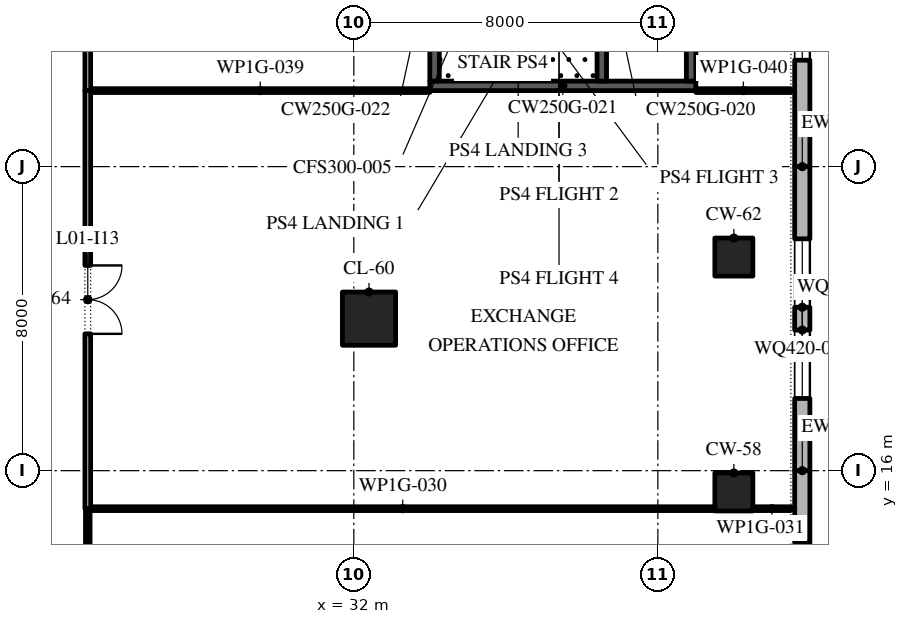
"""IFC4 building model, lengths in metres.
Left out: names, types, materials, properties, quantities, classifications, styles, units other than length and angle.
Written with IfcOpenShell. Run it as: python <this file> out.ifc"""

import sys

from ifc_helpers import new_model, si_unit, direction, frame, frame_2d, origin, origin_2d, place, context, subcontext, project, spatial, polyline, rectangle, outline, extrude, element, fill, save


model = new_model("IFC4")
c1 = context("Model", 3, precision=1e-05, world=origin(), true_north=direction((0.0, 1.0)))
c2 = subcontext(c1, "Body", "Model", "MODEL_VIEW")
j1 = project(units=[si_unit("LENGTHUNIT", "METRE"), si_unit("PLANEANGLEUNIT", "RADIAN")], contexts=[c1])
p1 = place(None, origin())
s1 = spatial("IfcSite", under=j1, at=p1, CompositionType="ELEMENT")
p2 = place(p1, origin())
s2 = spatial("IfcBuilding", under=s1, at=p2, CompositionType="ELEMENT")
p3 = place(p2, frame((0.0, 0.0, 8.0)))
s3 = spatial("IfcBuildingStorey", under=s2, at=p3, CompositionType="ELEMENT", Elevation=8.0)
p4 = place(p3, frame((42.0, 15.44, 0.0), z_axis=(0.0, 0.0, 1.0), x_axis=(1.0, 0.0, 0.0)))
e1 = element("IfcColumn", 1, at=p4, inside=s3, PredefinedType="COLUMN", context=c2, shape_type="SweptSolid", body=[
    extrude(rectangle(XDim=1.0, YDim=1.0, at=origin_2d()), origin(), (0.0, 0.0, 1.0), 6.0),
])
p5 = place(p3, frame((32.4, 20.0, 0.0), z_axis=(0.0, 0.0, 1.0), x_axis=(1.0, 0.0, 0.0)))
e2 = element("IfcColumn", 2, at=p5, inside=s3, PredefinedType="COLUMN", context=c2, shape_type="SweptSolid", body=[
    extrude(rectangle(XDim=1.4, YDim=1.4, at=origin_2d()), origin(), (0.0, 0.0, 1.0), 6.0),
])
p6 = place(p3, frame((42.0, 21.62, 0.0), z_axis=(0.0, 0.0, 1.0), x_axis=(1.0, 0.0, 0.0)))
e3 = element("IfcColumn", 3, at=p6, inside=s3, PredefinedType="COLUMN", context=c2, shape_type="SweptSolid", body=[
    extrude(rectangle(XDim=1.0, YDim=1.0, at=origin_2d()), origin(), (0.0, 0.0, 1.0), 6.0),
])
p7 = place(p3, frame((43.8, 8.0, 0.0), z_axis=(0.0, 0.0, 1.0), x_axis=(0.0, 1.0, 0.0)))
e4 = element("IfcWall", 4, at=p7, inside=s3, PredefinedType="STANDARD", context=c2, shape_type="SweptSolid", body=[
    extrude(rectangle(XDim=8.0, YDim=0.4, at=frame_2d((4.0, 0.0))), origin(), (0.0, 0.0, 1.0), 5.7),
])
p8 = place(p7, frame((1.9, 0.0, 0.9)))
e5 = element("IfcOpeningElement", 5, at=p8, cuts=e4, PredefinedType="OPENING", context=c2, shape_type="SweptSolid", body=[
    extrude(outline(polyline([(0.0, 0.0), (1.8, 0.0), (1.8, 2.641), (1.785, 2.876), (1.739, 3.107), (1.663, 3.33), (1.559, 3.541), (1.428, 3.737), (1.273, 3.914), (1.096, 4.069), (0.9, 4.2), (0.704, 4.069), (0.527, 3.914), (0.372, 3.737), (0.241, 3.541), (0.137, 3.33), (0.061, 3.107), (0.015, 2.876), (0.0, 2.641), (0.0, 0.0)])), frame((0.0, 0.21, 0.0), z_axis=(0.0, -1.0, 0.0), x_axis=(1.0, 0.0, 0.0)), (0.0, 0.0, 1.0), 0.42),
])
p9 = place(p7, frame((4.3, 0.0, 0.9)))
e6 = element("IfcOpeningElement", 6, at=p9, cuts=e4, PredefinedType="OPENING", context=c2, shape_type="SweptSolid", body=[
    extrude(outline(polyline([(0.0, 0.0), (1.8, 0.0), (1.8, 2.641), (1.785, 2.876), (1.739, 3.107), (1.663, 3.33), (1.559, 3.541), (1.428, 3.737), (1.273, 3.914), (1.096, 4.069), (0.9, 4.2), (0.704, 4.069), (0.527, 3.914), (0.372, 3.737), (0.241, 3.541), (0.137, 3.33), (0.061, 3.107), (0.015, 2.876), (0.0, 2.641), (0.0, 0.0)])), frame((0.0, 0.21, 0.0), z_axis=(0.0, -1.0, 0.0), x_axis=(1.0, 0.0, 0.0)), (0.0, 0.0, 1.0), 0.42),
])
p10 = place(p3, frame((43.8, 16.0, 0.0), z_axis=(0.0, 0.0, 1.0), x_axis=(0.0, 1.0, 0.0)))
e7 = element("IfcWall", 7, at=p10, inside=s3, PredefinedType="STANDARD", context=c2, shape_type="SweptSolid", body=[
    extrude(rectangle(XDim=8.0, YDim=0.4, at=frame_2d((4.0, 0.0))), origin(), (0.0, 0.0, 1.0), 5.7),
])
p11 = place(p10, frame((1.9, 0.0, 0.9)))
e8 = element("IfcOpeningElement", 8, at=p11, cuts=e7, PredefinedType="OPENING", context=c2, shape_type="SweptSolid", body=[
    extrude(outline(polyline([(0.0, 0.0), (1.8, 0.0), (1.8, 2.641), (1.785, 2.876), (1.739, 3.107), (1.663, 3.33), (1.559, 3.541), (1.428, 3.737), (1.273, 3.914), (1.096, 4.069), (0.9, 4.2), (0.704, 4.069), (0.527, 3.914), (0.372, 3.737), (0.241, 3.541), (0.137, 3.33), (0.061, 3.107), (0.015, 2.876), (0.0, 2.641), (0.0, 0.0)])), frame((0.0, 0.21, 0.0), z_axis=(0.0, -1.0, 0.0), x_axis=(1.0, 0.0, 0.0)), (0.0, 0.0, 1.0), 0.42),
])
p12 = place(p10, frame((4.3, 0.0, 0.9)))
e9 = element("IfcOpeningElement", 9, at=p12, cuts=e7, PredefinedType="OPENING", context=c2, shape_type="SweptSolid", body=[
    extrude(outline(polyline([(0.0, 0.0), (1.8, 0.0), (1.8, 2.641), (1.785, 2.876), (1.739, 3.107), (1.663, 3.33), (1.559, 3.541), (1.428, 3.737), (1.273, 3.914), (1.096, 4.069), (0.9, 4.2), (0.704, 4.069), (0.527, 3.914), (0.372, 3.737), (0.241, 3.541), (0.137, 3.33), (0.061, 3.107), (0.015, 2.876), (0.0, 2.641), (0.0, 0.0)])), frame((0.0, 0.21, 0.0), z_axis=(0.0, -1.0, 0.0), x_axis=(1.0, 0.0, 0.0)), (0.0, 0.0, 1.0), 0.42),
])
p13 = place(p3, frame((43.8, 24.0, 0.0), z_axis=(0.0, 0.0, 1.0), x_axis=(0.0, 1.0, 0.0)))
e10 = element("IfcWall", 10, at=p13, inside=s3, PredefinedType="STANDARD", context=c2, shape_type="SweptSolid", body=[
    extrude(rectangle(XDim=8.0, YDim=0.4, at=frame_2d((4.0, 0.0))), origin(), (0.0, 0.0, 1.0), 5.7),
])
p14 = place(p13, frame((2.8, 0.0, 0.9)))
e11 = element("IfcOpeningElement", 11, at=p14, cuts=e10, PredefinedType="OPENING", context=c2, shape_type="SweptSolid", body=[
    extrude(outline(polyline([(0.0, 0.0), (2.4, 0.0), (2.4, 2.122), (2.379, 2.435), (2.318, 2.743), (2.217, 3.04), (2.078, 3.322), (1.904, 3.583), (1.697, 3.819), (1.461, 4.026), (1.2, 4.2), (0.939, 4.026), (0.703, 3.819), (0.496, 3.583), (0.322, 3.322), (0.183, 3.04), (0.082, 2.743), (0.021, 2.435), (0.0, 2.122), (0.0, 0.0)])), frame((0.0, 0.21, 0.0), z_axis=(0.0, -1.0, 0.0), x_axis=(1.0, 0.0, 0.0)), (0.0, 0.0, 1.0), 0.42),
])
p15 = place(p3, frame((34.0, 26.125, 0.0), z_axis=(0.0, 0.0, 1.0), x_axis=(1.0, 0.0, 0.0)))
e12 = element("IfcWall", 12, at=p15, inside=s3, PredefinedType="SHEAR", context=c2, shape_type="SweptSolid", body=[
    extrude(rectangle(XDim=7.0, YDim=0.25, at=frame_2d((3.5, 0.0))), origin(), (0.0, 0.0, 1.0), 5.7),
])
p16 = place(p3, frame((34.125, 26.25, 0.0), z_axis=(0.0, 0.0, 1.0), x_axis=(0.0, 1.0, 0.0)))
e13 = element("IfcWall", 13, at=p16, inside=s3, PredefinedType="SHEAR", context=c2, shape_type="SweptSolid", body=[
    extrude(rectangle(XDim=7.5, YDim=0.25, at=frame_2d((3.75, 0.0))), origin(), (0.0, 0.0, 1.0), 5.7),
])
p17 = place(p16, frame((5.7, 0.0, 0.0)))
e14 = element("IfcOpeningElement", 14, at=p17, cuts=e13, PredefinedType="OPENING", context=c2, shape_type="SweptSolid", body=[
    extrude(rectangle(XDim=1.2, YDim=2.1, at=frame_2d((0.6, 1.05))), frame((0.0, 0.135, 0.0), z_axis=(0.0, -1.0, 0.0), x_axis=(1.0, 0.0, 0.0)), (0.0, 0.0, 1.0), 0.27),
])
p18 = place(p3, frame((40.875, 26.25, 0.0), z_axis=(0.0, 0.0, 1.0), x_axis=(0.0, 1.0, 0.0)))
e15 = element("IfcWall", 15, at=p18, inside=s3, PredefinedType="SHEAR", context=c2, shape_type="SweptSolid", body=[
    extrude(rectangle(XDim=7.5, YDim=0.25, at=frame_2d((3.75, 0.0))), origin(), (0.0, 0.0, 1.0), 5.7),
])
p19 = place(p18, frame((4.25, 0.0, 0.0)))
e16 = element("IfcOpeningElement", 16, at=p19, cuts=e15, PredefinedType="OPENING", context=c2, shape_type="SweptSolid", body=[
    extrude(rectangle(XDim=0.9, YDim=2.1, at=frame_2d((0.45, 1.05))), frame((0.0, 0.135, 0.0), z_axis=(0.0, -1.0, 0.0), x_axis=(1.0, 0.0, 0.0)), (0.0, 0.0, 1.0), 0.27),
])
p20 = place(p3, frame((38.525, 26.25, 0.0), z_axis=(0.0, 0.0, 1.0), x_axis=(0.0, 1.0, 0.0)))
e17 = element("IfcWall", 17, at=p20, inside=s3, PredefinedType="SHEAR", context=c2, shape_type="SweptSolid", body=[
    extrude(rectangle(XDim=7.5, YDim=0.25, at=frame_2d((3.75, 0.0))), origin(), (0.0, 0.0, 1.0), 5.7),
])
p21 = place(p3, frame((25.075, 15.0, 0.0), z_axis=(0.0, 0.0, 1.0), x_axis=(1.0, 0.0, 0.0)))
e18 = element("IfcWall", 18, at=p21, inside=s3, PredefinedType="PARTITIONING", context=c2, shape_type="SweptSolid", body=[
    extrude(rectangle(XDim=16.425, YDim=0.1, at=frame_2d((8.212, 0.0))), origin(), (0.0, 0.0, 1.0), 5.7),
])
p22 = place(p3, frame((42.5, 15.0, 0.0), z_axis=(0.0, 0.0, 1.0), x_axis=(1.0, 0.0, 0.0)))
e19 = element("IfcWall", 19, at=p22, inside=s3, PredefinedType="PARTITIONING", context=c2, shape_type="SweptSolid", body=[
    extrude(rectangle(XDim=1.0, YDim=0.1, at=frame_2d((0.5, 0.0))), origin(), (0.0, 0.0, 1.0), 5.7),
])
p23 = place(p3, frame((25.075, 26.0, 0.0), z_axis=(0.0, 0.0, 1.0), x_axis=(1.0, 0.0, 0.0)))
e20 = element("IfcWall", 20, at=p23, inside=s3, PredefinedType="PARTITIONING", context=c2, shape_type="SweptSolid", body=[
    extrude(rectangle(XDim=8.925, YDim=0.1, at=frame_2d((4.462, 0.0))), origin(), (0.0, 0.0, 1.0), 5.7),
])
p24 = place(p3, frame((41.0, 26.0, 0.0), z_axis=(0.0, 0.0, 1.0), x_axis=(1.0, 0.0, 0.0)))
e21 = element("IfcWall", 21, at=p24, inside=s3, PredefinedType="PARTITIONING", context=c2, shape_type="SweptSolid", body=[
    extrude(rectangle(XDim=2.5, YDim=0.1, at=frame_2d((1.25, 0.0))), origin(), (0.0, 0.0, 1.0), 5.7),
])
p25 = place(p3, frame((25.0, 4.0, 0.0), z_axis=(0.0, 0.0, 1.0), x_axis=(0.0, 1.0, 0.0)))
e22 = element("IfcWall", 22, at=p25, inside=s3, PredefinedType="PARTITIONING", context=c2, shape_type="SweptSolid", body=[
    extrude(rectangle(XDim=11.0, YDim=0.12, at=frame_2d((5.5, 0.0))), origin(), (0.0, 0.0, 1.0), 5.7),
])
p26 = place(p25, frame((4.6, 0.0, 0.0)))
e23 = element("IfcOpeningElement", 23, at=p26, cuts=e22, PredefinedType="OPENING", context=c2, shape_type="SweptSolid", body=[
    extrude(rectangle(XDim=1.8, YDim=2.1, at=frame_2d((0.9, 1.05))), frame((0.0, 0.07, 0.0), z_axis=(0.0, -1.0, 0.0), x_axis=(1.0, 0.0, 0.0)), (0.0, 0.0, 1.0), 0.14),
])
p27 = place(p3, frame((25.0, 15.0, 0.0), z_axis=(0.0, 0.0, 1.0), x_axis=(0.0, 1.0, 0.0)))
e24 = element("IfcWall", 24, at=p27, inside=s3, PredefinedType="PARTITIONING", context=c2, shape_type="SweptSolid", body=[
    extrude(rectangle(XDim=11.0, YDim=0.15, at=frame_2d((5.5, 0.0))), origin(), (0.0, 0.0, 1.0), 5.7),
])
p28 = place(p27, frame((4.6, 0.0, 0.0)))
e25 = element("IfcOpeningElement", 25, at=p28, cuts=e24, PredefinedType="OPENING", context=c2, shape_type="SweptSolid", body=[
    extrude(rectangle(XDim=1.8, YDim=2.1, at=frame_2d((0.9, 1.05))), frame((0.0, 0.085, 0.0), z_axis=(0.0, -1.0, 0.0), x_axis=(1.0, 0.0, 0.0)), (0.0, 0.0, 1.0), 0.17),
])
p29 = place(p3, frame((25.0, 26.0, 0.0), z_axis=(0.0, 0.0, 1.0), x_axis=(0.0, 1.0, 0.0)))
e26 = element("IfcWall", 26, at=p29, inside=s3, PredefinedType="PARTITIONING", context=c2, shape_type="SweptSolid", body=[
    extrude(rectangle(XDim=9.5, YDim=0.15, at=frame_2d((4.75, 0.0))), origin(), (0.0, 0.0, 1.0), 5.7),
])
p30 = place(p29, frame((4.25, 0.0, 0.0)))
e27 = element("IfcOpeningElement", 27, at=p30, cuts=e26, PredefinedType="OPENING", context=c2, shape_type="SweptSolid", body=[
    extrude(rectangle(XDim=1.0, YDim=2.1, at=frame_2d((0.5, 1.05))), frame((0.0, 0.085, 0.0), z_axis=(0.0, -1.0, 0.0), x_axis=(1.0, 0.0, 0.0)), (0.0, 0.0, 1.0), 0.17),
])
p31 = place(p9, origin())
e28 = element("IfcWindow", 28, at=p31, inside=s3, PartitioningType="DOUBLE_PANEL_VERTICAL", PredefinedType="WINDOW", context=c2, shape_type="SweptSolid", body=[
    extrude(outline(polyline([(0.0, 0.0), (1.8, 0.0), (1.8, 2.641), (1.785, 2.876), (1.739, 3.107), (1.663, 3.33), (1.559, 3.541), (1.428, 3.737), (1.273, 3.914), (1.096, 4.069), (0.9, 4.2), (0.704, 4.069), (0.527, 3.914), (0.372, 3.737), (0.241, 3.541), (0.137, 3.33), (0.061, 3.107), (0.015, 2.876), (0.0, 2.641), (0.0, 0.0)])), frame((0.0, 0.03, 0.0), z_axis=(0.0, -1.0, 0.0), x_axis=(1.0, 0.0, 0.0)), (0.0, 0.0, 1.0), 0.06),
])
fill(e6, e28)
p32 = place(p11, origin())
e29 = element("IfcWindow", 29, at=p32, inside=s3, PartitioningType="DOUBLE_PANEL_VERTICAL", PredefinedType="WINDOW", context=c2, shape_type="SweptSolid", body=[
    extrude(outline(polyline([(0.0, 0.0), (1.8, 0.0), (1.8, 2.641), (1.785, 2.876), (1.739, 3.107), (1.663, 3.33), (1.559, 3.541), (1.428, 3.737), (1.273, 3.914), (1.096, 4.069), (0.9, 4.2), (0.704, 4.069), (0.527, 3.914), (0.372, 3.737), (0.241, 3.541), (0.137, 3.33), (0.061, 3.107), (0.015, 2.876), (0.0, 2.641), (0.0, 0.0)])), frame((0.0, 0.03, 0.0), z_axis=(0.0, -1.0, 0.0), x_axis=(1.0, 0.0, 0.0)), (0.0, 0.0, 1.0), 0.06),
])
fill(e8, e29)
p33 = place(p12, origin())
e30 = element("IfcWindow", 30, at=p33, inside=s3, PartitioningType="DOUBLE_PANEL_VERTICAL", PredefinedType="WINDOW", context=c2, shape_type="SweptSolid", body=[
    extrude(outline(polyline([(0.0, 0.0), (1.8, 0.0), (1.8, 2.641), (1.785, 2.876), (1.739, 3.107), (1.663, 3.33), (1.559, 3.541), (1.428, 3.737), (1.273, 3.914), (1.096, 4.069), (0.9, 4.2), (0.704, 4.069), (0.527, 3.914), (0.372, 3.737), (0.241, 3.541), (0.137, 3.33), (0.061, 3.107), (0.015, 2.876), (0.0, 2.641), (0.0, 0.0)])), frame((0.0, 0.03, 0.0), z_axis=(0.0, -1.0, 0.0), x_axis=(1.0, 0.0, 0.0)), (0.0, 0.0, 1.0), 0.06),
])
fill(e9, e30)
p34 = place(p14, origin())
e31 = element("IfcWindow", 31, at=p34, inside=s3, PartitioningType="DOUBLE_PANEL_VERTICAL", PredefinedType="WINDOW", context=c2, shape_type="SweptSolid", body=[
    extrude(outline(polyline([(0.0, 0.0), (2.4, 0.0), (2.4, 2.122), (2.379, 2.435), (2.318, 2.743), (2.217, 3.04), (2.078, 3.322), (1.904, 3.583), (1.697, 3.819), (1.461, 4.026), (1.2, 4.2), (0.939, 4.026), (0.703, 3.819), (0.496, 3.583), (0.322, 3.322), (0.183, 3.04), (0.082, 2.743), (0.021, 2.435), (0.0, 2.122), (0.0, 0.0)])), frame((0.0, 0.03, 0.0), z_axis=(0.0, -1.0, 0.0), x_axis=(1.0, 0.0, 0.0)), (0.0, 0.0, 1.0), 0.06),
])
fill(e11, e31)
p35 = place(p28, frame((1.8, 0.0, 0.0), z_axis=(0.0, 0.0, 1.0), x_axis=(-1.0, 0.0, 0.0)))
e32 = element("IfcDoor", 32, at=p35, inside=s3, OperationType="SINGLE_SWING_LEFT", PredefinedType="DOOR", context=c2, shape_type="SweptSolid", body=[
    extrude(rectangle(XDim=1.8, YDim=2.1, at=frame_2d((0.9, 1.05))), frame((0.0, 0.025, 0.0), z_axis=(0.0, -1.0, 0.0), x_axis=(1.0, 0.0, 0.0)), (0.0, 0.0, 1.0), 0.05),
])
fill(e25, e32)
save(model, sys.argv[1])
